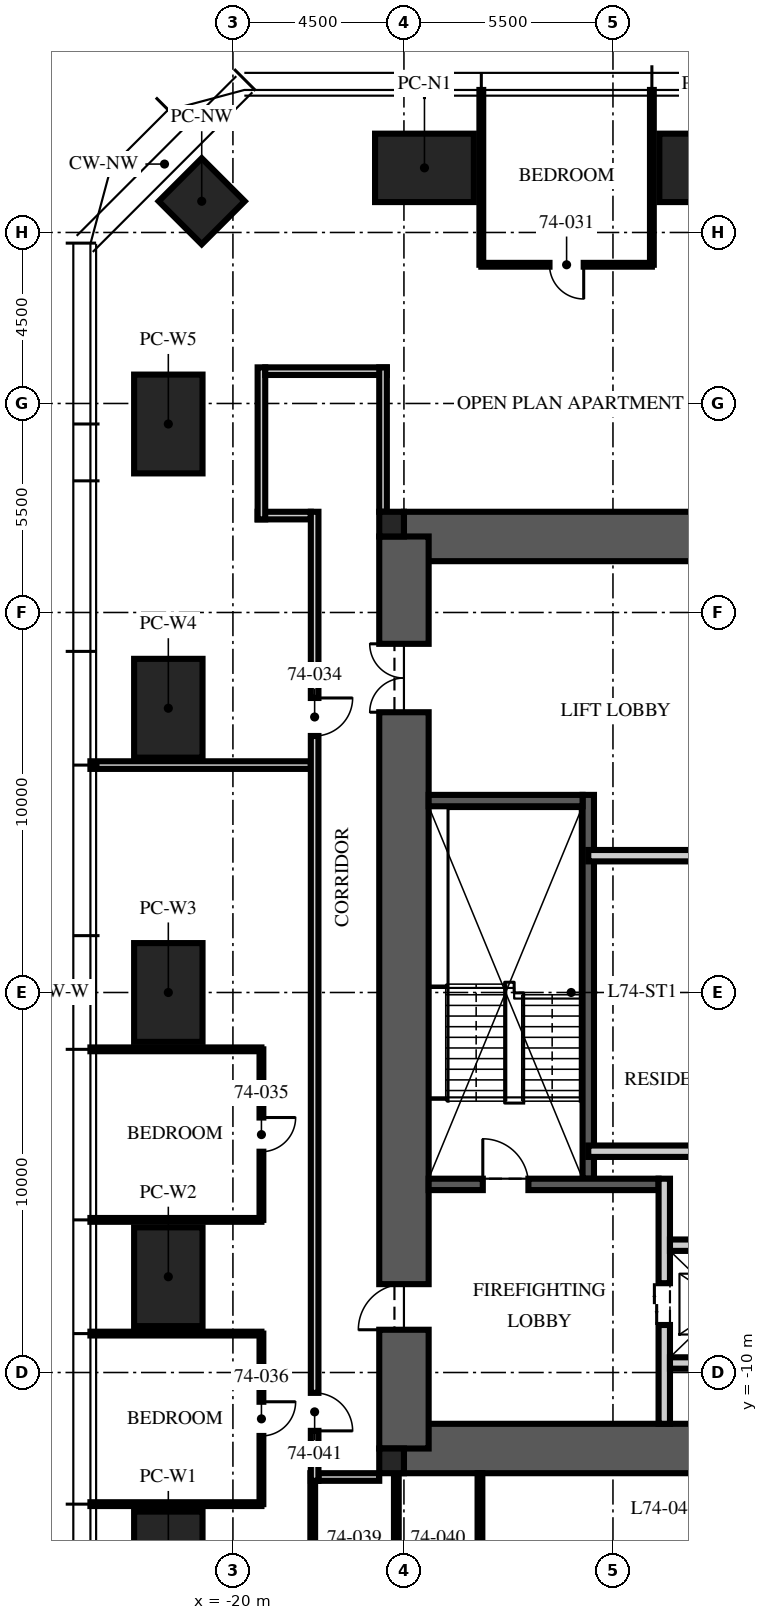
"""IFC4 building model, lengths in metres.
Left out: names, types, materials, properties, quantities, classifications, styles, units other than length and angle.
Written with IfcOpenShell. Run it as: python <this file> out.ifc"""

import sys

from ifc_helpers import new_model, si_unit, direction, frame, frame_2d, origin, origin_2d, place, context, subcontext, project, spatial, rectangle, extrude, element, fill, save


model = new_model("IFC4")
c1 = context("Model", 3, precision=1e-05, world=origin(), true_north=direction((0.0, 1.0)))
c2 = subcontext(c1, "Body", "Model", "MODEL_VIEW")
j1 = project(units=[si_unit("LENGTHUNIT", "METRE"), si_unit("PLANEANGLEUNIT", "RADIAN")], contexts=[c1])
p1 = place(None, origin())
s1 = spatial("IfcSite", under=j1, at=p1, CompositionType="ELEMENT")
p2 = place(p1, origin())
s2 = spatial("IfcBuilding", under=s1, at=p2, CompositionType="ELEMENT")
p3 = place(p2, frame((0.0, 0.0, 297.0)))
s3 = spatial("IfcBuildingStorey", under=s2, at=p3, CompositionType="ELEMENT", Elevation=297.0)
for number, where, z_axis, x_axis in (
    (1, (-15.5, 12.0, -0.25), (0.0, 0.0, 1.0), (1.0, 0.0, 0.0)),
    (2, (-15.5, -12.0, -0.25), (0.0, 0.0, 1.0), (1.0, 0.0, 0.0)),
):
    element("IfcWall", number, at=place(p3, frame(where, z_axis=z_axis, x_axis=x_axis)), inside=s3, PredefinedType="SHEAR", context=c2, shape_type="SweptSolid", body=[
        extrude(rectangle(XDim=31.0, YDim=1.3, at=frame_2d((15.5, 0.0))), origin(), (0.0, 0.0, 1.0), 3.75),
    ])
p4 = place(p3, frame((-15.5, -12.0, -0.25), z_axis=(0.0, 0.0, 1.0), x_axis=(0.0, 1.0, 0.0)))
e3 = element("IfcWall", 3, at=p4, inside=s3, PredefinedType="SHEAR", context=c2, shape_type="SweptSolid", body=[
    extrude(rectangle(XDim=24.0, YDim=1.3, at=frame_2d((12.0, 0.0))), origin(), (0.0, 0.0, 1.0), 3.75),
])
p5 = place(p4, frame((3.125, 0.0, 0.25)))
e4 = element("IfcOpeningElement", 4, at=p5, cuts=e3, PredefinedType="OPENING", context=c2, shape_type="SweptSolid", body=[
    extrude(rectangle(XDim=1.2, YDim=2.1, at=frame_2d((0.6, 1.05))), frame((0.0, 0.66, 0.0), z_axis=(0.0, -1.0, 0.0), x_axis=(1.0, 0.0, 0.0)), (0.0, 0.0, 1.0), 1.32),
])
p6 = place(p4, frame((19.375, 0.0, 0.25)))
e5 = element("IfcOpeningElement", 5, at=p6, cuts=e3, PredefinedType="OPENING", context=c2, shape_type="SweptSolid", body=[
    extrude(rectangle(XDim=1.8, YDim=2.1, at=frame_2d((0.9, 1.05))), frame((0.0, 0.66, 0.0), z_axis=(0.0, -1.0, 0.0), x_axis=(1.0, 0.0, 0.0)), (0.0, 0.0, 1.0), 1.32),
])
for number, where, z_axis, x_axis in (
    (6, (-15.825, 12.325, -0.25), (0.0, 0.0, 1.0), (1.0, 0.0, 0.0)),
    (7, (-15.825, -12.325, -0.25), (0.0, 0.0, 1.0), (1.0, 0.0, 0.0)),
):
    element("IfcColumn", number, at=place(p3, frame(where, z_axis=z_axis, x_axis=x_axis)), inside=s3, PredefinedType="COLUMN", context=c2, shape_type="SweptSolid", body=[
        extrude(rectangle(XDim=0.65, YDim=0.65, at=origin_2d()), origin(), (0.0, 0.0, 1.0), 3.75),
    ])
for number, where, z_axis, x_axis in (
    (8, (-14.96, 21.7, 0.0), (0.0, 0.0, 1.0), (1.0, 0.0, 0.0)),
    (9, (-7.48, 21.7, 0.0), (0.0, 0.0, 1.0), (1.0, 0.0, 0.0)),
    (10, (-21.7, -14.96, 0.0), (0.0, 0.0, 1.0), (0.0, 1.0, 0.0)),
    (11, (-21.7, -7.48, 0.0), (0.0, 0.0, 1.0), (0.0, 1.0, 0.0)),
    (12, (-21.7, 0.0, 0.0), (0.0, 0.0, 1.0), (0.0, 1.0, 0.0)),
    (13, (-21.7, 7.48, 0.0), (0.0, 0.0, 1.0), (0.0, 1.0, 0.0)),
    (14, (-21.7, 14.96, 0.0), (0.0, 0.0, 1.0), (0.0, 1.0, 0.0)),
):
    element("IfcColumn", number, at=place(p3, frame(where, z_axis=z_axis, x_axis=x_axis)), inside=s3, PredefinedType="COLUMN", context=c2, shape_type="SweptSolid", body=[
        extrude(rectangle(XDim=2.6, YDim=1.8, at=origin_2d()), origin(), (0.0, 0.0, 1.0), 3.75),
    ])
p7 = place(p3, frame((-20.821, 20.821, 0.0), z_axis=(0.0, 0.0, 1.0), x_axis=(0.707106781187, 0.707106781187, 0.0)))
e15 = element("IfcColumn", 15, at=p7, inside=s3, PredefinedType="COLUMN", context=c2, shape_type="SweptSolid", body=[
    extrude(rectangle(XDim=1.6, YDim=1.6, at=origin_2d()), origin(), (0.0, 0.0, 1.0), 3.75),
])
p8 = place(p3, frame((-10.65, -4.9, 0.0), z_axis=(0.0, 0.0, 1.0), x_axis=(0.0, 1.0, 0.0)))
e16 = element("IfcWall", 16, at=p8, inside=s3, PredefinedType="SOLIDWALL", context=c2, shape_type="SweptSolid", body=[
    extrude(rectangle(XDim=10.1, YDim=0.3, at=frame_2d((5.05, 0.0))), origin(), (0.0, 0.0, 1.0), 3.5),
])
p9 = place(p3, frame((-14.85, -5.05, 0.0), z_axis=(0.0, 0.0, 1.0), x_axis=(1.0, 0.0, 0.0)))
e17 = element("IfcWall", 17, at=p9, inside=s3, PredefinedType="SOLIDWALL", context=c2, shape_type="SweptSolid", body=[
    extrude(rectangle(XDim=6.05, YDim=0.3, at=frame_2d((3.025, 0.0))), origin(), (0.0, 0.0, 1.0), 3.5),
])
p10 = place(p9, frame((1.425, 0.0, 0.0)))
e18 = element("IfcOpeningElement", 18, at=p10, cuts=e17, PredefinedType="OPENING", context=c2, shape_type="SweptSolid", body=[
    extrude(rectangle(XDim=1.2, YDim=2.1, at=frame_2d((0.6, 1.05))), frame((0.0, 0.16, 0.0), z_axis=(0.0, -1.0, 0.0), x_axis=(1.0, 0.0, 0.0)), (0.0, 0.0, 1.0), 0.32),
])
p11 = place(p3, frame((-14.85, 5.05, 0.0), z_axis=(0.0, 0.0, 1.0), x_axis=(1.0, 0.0, 0.0)))
e19 = element("IfcWall", 19, at=p11, inside=s3, PredefinedType="SOLIDWALL", context=c2, shape_type="SweptSolid", body=[
    extrude(rectangle(XDim=4.05, YDim=0.3, at=frame_2d((2.025, 0.0))), origin(), (0.0, 0.0, 1.0), 3.5),
])
p12 = place(p3, frame((-8.65, -11.35, 0.0), z_axis=(0.0, 0.0, 1.0), x_axis=(0.0, 1.0, 0.0)))
e20 = element("IfcWall", 20, at=p12, inside=s3, PredefinedType="PARTITIONING", context=c2, shape_type="SweptSolid", body=[
    extrude(rectangle(XDim=6.45, YDim=0.3, at=frame_2d((3.225, 0.0))), origin(), (0.0, 0.0, 1.0), 3.5),
])
p13 = place(p12, frame((2.6, 0.0, 0.0)))
e21 = element("IfcOpeningElement", 21, at=p13, cuts=e20, PredefinedType="OPENING", context=c2, shape_type="SweptSolid", body=[
    extrude(rectangle(XDim=1.1, YDim=2.1, at=frame_2d((0.55, 1.05))), frame((0.0, 0.16, 0.0), z_axis=(0.0, -1.0, 0.0), x_axis=(1.0, 0.0, 0.0)), (0.0, 0.0, 1.0), 0.32),
])
p14 = place(p3, frame((-8.5, -6.65, 0.0), z_axis=(0.0, 0.0, 1.0), x_axis=(1.0, 0.0, 0.0)))
e22 = element("IfcWall", 22, at=p14, inside=s3, PredefinedType="PARTITIONING", context=c2, shape_type="SweptSolid", body=[
    extrude(rectangle(XDim=17.0, YDim=0.3, at=frame_2d((8.5, 0.0))), origin(), (0.0, 0.0, 1.0), 3.5),
])
p15 = place(p14, frame((7.8, 0.0, 0.0)))
e23 = element("IfcOpeningElement", 23, at=p15, cuts=e22, PredefinedType="OPENING", context=c2, shape_type="SweptSolid", body=[
    extrude(rectangle(XDim=1.3, YDim=2.4, at=frame_2d((0.65, 1.2))), frame((0.0, 0.16, 0.0), z_axis=(0.0, -1.0, 0.0), x_axis=(1.0, 0.0, 0.0)), (0.0, 0.0, 1.0), 0.32),
])
p16 = place(p14, frame((5.65, 0.0, 0.0)))
e24 = element("IfcOpeningElement", 24, at=p16, cuts=e22, PredefinedType="OPENING", context=c2, shape_type="SweptSolid", body=[
    extrude(rectangle(XDim=0.9, YDim=2.1, at=frame_2d((0.45, 1.05))), frame((0.0, 0.16, 0.0), z_axis=(0.0, -1.0, 0.0), x_axis=(1.0, 0.0, 0.0)), (0.0, 0.0, 1.0), 0.32),
])
p17 = place(p14, frame((10.4, 0.0, 0.0)))
e25 = element("IfcOpeningElement", 25, at=p17, cuts=e22, PredefinedType="OPENING", context=c2, shape_type="SweptSolid", body=[
    extrude(rectangle(XDim=0.9, YDim=2.1, at=frame_2d((0.45, 1.05))), frame((0.0, 0.16, 0.0), z_axis=(0.0, -1.0, 0.0), x_axis=(1.0, 0.0, 0.0)), (0.0, 0.0, 1.0), 0.32),
])
p18 = place(p3, frame((-8.5, -9.75, 0.0), z_axis=(0.0, 0.0, 1.0), x_axis=(1.0, 0.0, 0.0)))
e26 = element("IfcWall", 26, at=p18, inside=s3, PredefinedType="PARTITIONING", context=c2, shape_type="SweptSolid", body=[
    extrude(rectangle(XDim=2.9, YDim=0.3, at=frame_2d((1.45, 0.0))), origin(), (0.0, 0.0, 1.0), 3.5),
])
p19 = place(p3, frame((-10.65, 3.6, 0.0), z_axis=(0.0, 0.0, 1.0), x_axis=(1.0, 0.0, 0.0)))
e27 = element("IfcWall", 27, at=p19, inside=s3, PredefinedType="PARTITIONING", context=c2, shape_type="SweptSolid", body=[
    extrude(rectangle(XDim=21.3, YDim=0.3, at=frame_2d((10.65, 0.0))), origin(), (0.0, 0.0, 1.0), 3.5),
])
p20 = place(p19, frame((10.05, 0.0, 0.0)))
e28 = element("IfcOpeningElement", 28, at=p20, cuts=e27, PredefinedType="OPENING", context=c2, shape_type="SweptSolid", body=[
    extrude(rectangle(XDim=1.2, YDim=2.1, at=frame_2d((0.6, 1.05))), frame((0.0, 0.16, 0.0), z_axis=(0.0, -1.0, 0.0), x_axis=(1.0, 0.0, 0.0)), (0.0, 0.0, 1.0), 0.32),
])
p21 = place(p19, frame((19.238, 0.0, 0.0)))
e29 = element("IfcOpeningElement", 29, at=p21, cuts=e27, PredefinedType="OPENING", context=c2, shape_type="SweptSolid", body=[
    extrude(rectangle(XDim=0.9, YDim=2.1, at=frame_2d((0.45, 1.05))), frame((0.0, 0.16, 0.0), z_axis=(0.0, -1.0, 0.0), x_axis=(1.0, 0.0, 0.0)), (0.0, 0.0, 1.0), 0.32),
])
p22 = place(p3, frame((-10.65, -4.177, 0.0), z_axis=(0.0, 0.0, 1.0), x_axis=(1.0, 0.0, 0.0)))
e30 = element("IfcWall", 30, at=p22, inside=s3, PredefinedType="PARTITIONING", context=c2, shape_type="SweptSolid", body=[
    extrude(rectangle(XDim=6.45, YDim=0.3, at=frame_2d((3.225, 0.0))), origin(), (0.0, 0.0, 1.0), 3.5),
])
p23 = place(p3, frame((-17.95, 12.55, 0.0), z_axis=(0.0, 0.0, 1.0), x_axis=(-1.0, 0.0, 0.0)))
e31 = element("IfcWall", 31, at=p23, inside=s3, PredefinedType="PARTITIONING", context=c2, shape_type="SweptSolid", body=[
    extrude(rectangle(XDim=1.4, YDim=0.2, at=frame_2d((0.7, 0.0))), origin(), (0.0, 0.0, 1.0), 3.5),
])
p24 = place(p3, frame((-19.25, 12.45, 0.0), z_axis=(0.0, 0.0, 1.0), x_axis=(0.0, 1.0, 0.0)))
e32 = element("IfcWall", 32, at=p24, inside=s3, PredefinedType="PARTITIONING", context=c2, shape_type="SweptSolid", body=[
    extrude(rectangle(XDim=4.0, YDim=0.2, at=frame_2d((2.0, 0.0))), origin(), (0.0, 0.0, 1.0), 2.9),
])
p25 = place(p3, frame((-19.15, 16.35, 0.0), z_axis=(0.0, 0.0, 1.0), x_axis=(1.0, 0.0, 0.0)))
e33 = element("IfcWall", 33, at=p25, inside=s3, PredefinedType="PARTITIONING", context=c2, shape_type="SweptSolid", body=[
    extrude(rectangle(XDim=3.2, YDim=0.2, at=frame_2d((1.6, 0.0))), origin(), (0.0, 0.0, 1.0), 2.6),
])
p26 = place(p3, frame((-16.05, 16.45, 0.0), z_axis=(0.0, 0.0, 1.0), x_axis=(0.0, -1.0, 0.0)))
e34 = element("IfcWall", 34, at=p26, inside=s3, PredefinedType="PARTITIONING", context=c2, shape_type="SweptSolid", body=[
    extrude(rectangle(XDim=3.8, YDim=0.2, at=frame_2d((1.9, 0.0))), origin(), (0.0, 0.0, 1.0), 2.6),
])
p27 = place(p3, frame((-16.15, -12.75, 0.0), z_axis=(0.0, 0.0, 1.0), x_axis=(-1.0, 0.0, 0.0)))
e35 = element("IfcWall", 35, at=p27, inside=s3, PredefinedType="PARTITIONING", context=c2, shape_type="SweptSolid", body=[
    extrude(rectangle(XDim=1.6, YDim=0.2, at=frame_2d((0.8, 0.0))), origin(), (0.0, 0.0, 1.0), 2.6),
])
for number, where, z_axis, x_axis in (
    (36, (-8.976, 19.15, 0.0), (0.0, 0.0, 1.0), (0.0, 1.0, 0.0)),
    (37, (-13.464, 19.15, 0.0), (0.0, 0.0, 1.0), (0.0, 1.0, 0.0)),
):
    element("IfcWall", number, at=place(p3, frame(where, z_axis=z_axis, x_axis=x_axis)), inside=s3, PredefinedType="PARTITIONING", context=c2, shape_type="SweptSolid", body=[
        extrude(rectangle(XDim=4.6, YDim=0.1, at=frame_2d((2.3, 0.0))), origin(), (0.0, 0.0, 1.0), 3.01),
    ])
p28 = place(p3, frame((-17.95, 5.984, 0.0), z_axis=(0.0, 0.0, 1.0), x_axis=(-1.0, 0.0, 0.0)))
e38 = element("IfcWall", 38, at=p28, inside=s3, PredefinedType="PARTITIONING", context=c2, shape_type="SweptSolid", body=[
    extrude(rectangle(XDim=5.8, YDim=0.2, at=frame_2d((2.9, 0.0))), origin(), (0.0, 0.0, 1.0), 3.01),
])
for number, where, z_axis, x_axis in (
    (39, (-19.25, -1.496, 0.0), (0.0, 0.0, 1.0), (-1.0, 0.0, 0.0)),
    (40, (-19.25, -5.984, 0.0), (0.0, 0.0, 1.0), (-1.0, 0.0, 0.0)),
    (41, (-19.25, -8.976, 0.0), (0.0, 0.0, 1.0), (-1.0, 0.0, 0.0)),
    (42, (-19.25, -13.464, 0.0), (0.0, 0.0, 1.0), (-1.0, 0.0, 0.0)),
):
    element("IfcWall", number, at=place(p3, frame(where, z_axis=z_axis, x_axis=x_axis)), inside=s3, PredefinedType="PARTITIONING", context=c2, shape_type="SweptSolid", body=[
        extrude(rectangle(XDim=4.5, YDim=0.1, at=frame_2d((2.25, 0.0))), origin(), (0.0, 0.0, 1.0), 3.01),
    ])
p29 = place(p3, frame((-8.976, 19.15, 0.0), z_axis=(0.0, 0.0, 1.0), x_axis=(-1.0, 0.0, 0.0)))
e43 = element("IfcWall", 43, at=p29, inside=s3, PredefinedType="PARTITIONING", context=c2, shape_type="SweptSolid", body=[
    extrude(rectangle(XDim=4.488, YDim=0.1, at=frame_2d((2.244, 0.0))), origin(), (0.0, 0.0, 1.0), 2.91),
])
p30 = place(p29, frame((1.794, 0.0, 0.0)))
e44 = element("IfcOpeningElement", 44, at=p30, cuts=e43, PredefinedType="OPENING", context=c2, shape_type="SweptSolid", body=[
    extrude(rectangle(XDim=0.9, YDim=2.1, at=frame_2d((0.45, 1.05))), frame((0.0, 0.06, 0.0), z_axis=(0.0, -1.0, 0.0), x_axis=(1.0, 0.0, 0.0)), (0.0, 0.0, 1.0), 0.12),
])
p31 = place(p3, frame((-19.25, -1.496, 0.0), z_axis=(0.0, 0.0, 1.0), x_axis=(0.0, -1.0, 0.0)))
e45 = element("IfcWall", 45, at=p31, inside=s3, PredefinedType="PARTITIONING", context=c2, shape_type="SweptSolid", body=[
    extrude(rectangle(XDim=4.488, YDim=0.1, at=frame_2d((2.244, 0.0))), origin(), (0.0, 0.0, 1.0), 2.91),
])
p32 = place(p31, frame((1.794, 0.0, 0.0)))
e46 = element("IfcOpeningElement", 46, at=p32, cuts=e45, PredefinedType="OPENING", context=c2, shape_type="SweptSolid", body=[
    extrude(rectangle(XDim=0.9, YDim=2.1, at=frame_2d((0.45, 1.05))), frame((0.0, 0.06, 0.0), z_axis=(0.0, -1.0, 0.0), x_axis=(1.0, 0.0, 0.0)), (0.0, 0.0, 1.0), 0.12),
])
p33 = place(p3, frame((-19.25, -8.976, 0.0), z_axis=(0.0, 0.0, 1.0), x_axis=(0.0, -1.0, 0.0)))
e47 = element("IfcWall", 47, at=p33, inside=s3, PredefinedType="PARTITIONING", context=c2, shape_type="SweptSolid", body=[
    extrude(rectangle(XDim=4.488, YDim=0.1, at=frame_2d((2.244, 0.0))), origin(), (0.0, 0.0, 1.0), 2.91),
])
p34 = place(p33, frame((1.794, 0.0, 0.0)))
e48 = element("IfcOpeningElement", 48, at=p34, cuts=e47, PredefinedType="OPENING", context=c2, shape_type="SweptSolid", body=[
    extrude(rectangle(XDim=0.9, YDim=2.1, at=frame_2d((0.45, 1.05))), frame((0.0, 0.06, 0.0), z_axis=(0.0, -1.0, 0.0), x_axis=(1.0, 0.0, 0.0)), (0.0, 0.0, 1.0), 0.12),
])
p35 = place(p3, frame((-17.9, -12.65, 0.0), z_axis=(0.0, 0.0, 1.0), x_axis=(0.0, -1.0, 0.0)))
e49 = element("IfcWall", 49, at=p35, inside=s3, PredefinedType="PARTITIONING", context=c2, shape_type="SweptSolid", body=[
    extrude(rectangle(XDim=2.8, YDim=0.125, at=frame_2d((1.4, 0.0))), origin(), (0.0, 0.0, 1.0), 2.9),
])
p36 = place(p3, frame((-15.7, -12.65, 0.0), z_axis=(0.0, 0.0, 1.0), x_axis=(0.0, -1.0, 0.0)))
e50 = element("IfcWall", 50, at=p36, inside=s3, PredefinedType="PARTITIONING", context=c2, shape_type="SweptSolid", body=[
    extrude(rectangle(XDim=2.8, YDim=0.125, at=frame_2d((1.4, 0.0))), origin(), (0.0, 0.0, 1.0), 2.6),
])
p37 = place(p3, frame((-13.5, -12.65, 0.0), z_axis=(0.0, 0.0, 1.0), x_axis=(0.0, -1.0, 0.0)))
e51 = element("IfcWall", 51, at=p37, inside=s3, PredefinedType="PARTITIONING", context=c2, shape_type="SweptSolid", body=[
    extrude(rectangle(XDim=2.8, YDim=0.125, at=frame_2d((1.4, 0.0))), origin(), (0.0, 0.0, 1.0), 3.5),
])
p38 = place(p3, frame((-17.85, 12.65, 0.0), z_axis=(0.0, 0.0, 1.0), x_axis=(0.0, -1.0, 0.0)))
e52 = element("IfcWall", 52, at=p38, inside=s3, PredefinedType="PARTITIONING", context=c2, shape_type="SweptSolid", body=[
    extrude(rectangle(XDim=25.5, YDim=0.2, at=frame_2d((12.75, 0.0))), origin(), (0.0, 0.0, 1.0), 2.9),
])
p39 = place(p38, frame((4.9, 0.0, 0.0)))
e53 = element("IfcOpeningElement", 53, at=p39, cuts=e52, PredefinedType="OPENING", context=c2, shape_type="SweptSolid", body=[
    extrude(rectangle(XDim=1.0, YDim=2.2, at=frame_2d((0.5, 1.1))), frame((0.0, 0.11, 0.0), z_axis=(0.0, -1.0, 0.0), x_axis=(1.0, 0.0, 0.0)), (0.0, 0.0, 1.0), 0.22),
])
p40 = place(p38, frame((23.186, 0.0, 0.0)))
e54 = element("IfcOpeningElement", 54, at=p40, cuts=e52, PredefinedType="OPENING", context=c2, shape_type="SweptSolid", body=[
    extrude(rectangle(XDim=1.0, YDim=2.2, at=frame_2d((0.5, 1.1))), frame((0.0, 0.11, 0.0), z_axis=(0.0, -1.0, 0.0), x_axis=(1.0, 0.0, 0.0)), (0.0, 0.0, 1.0), 0.22),
])
p41 = place(p10, origin())
e55 = element("IfcDoor", 55, at=p41, inside=s3, OperationType="SINGLE_SWING_LEFT", PredefinedType="DOOR", context=c2, shape_type="SweptSolid", body=[
    extrude(rectangle(XDim=1.2, YDim=2.1, at=frame_2d((0.6, 1.05))), frame((0.0, 0.025, 0.0), z_axis=(0.0, -1.0, 0.0), x_axis=(1.0, 0.0, 0.0)), (0.0, 0.0, 1.0), 0.05),
])
fill(e18, e55)
p42 = place(p5, origin())
e56 = element("IfcDoor", 56, at=p42, inside=s3, OperationType="SINGLE_SWING_LEFT", PredefinedType="DOOR", context=c2, shape_type="SweptSolid", body=[
    extrude(rectangle(XDim=1.2, YDim=2.1, at=frame_2d((0.6, 1.05))), frame((0.0, 0.025, 0.0), z_axis=(0.0, -1.0, 0.0), x_axis=(1.0, 0.0, 0.0)), (0.0, 0.0, 1.0), 0.05),
])
fill(e4, e56)
p43 = place(p6, origin())
e57 = element("IfcDoor", 57, at=p43, inside=s3, OperationType="DOUBLE_DOOR_SINGLE_SWING", PredefinedType="DOOR", context=c2, shape_type="SweptSolid", body=[
    extrude(rectangle(XDim=1.8, YDim=2.1, at=frame_2d((0.9, 1.05))), frame((0.0, 0.025, 0.0), z_axis=(0.0, -1.0, 0.0), x_axis=(1.0, 0.0, 0.0)), (0.0, 0.0, 1.0), 0.05),
])
fill(e5, e57)
p44 = place(p13, origin())
e58 = element("IfcDoor", 58, at=p44, inside=s3, OperationType="DOUBLE_DOOR_SLIDING", PredefinedType="DOOR", context=c2, shape_type="SweptSolid", body=[
    extrude(rectangle(XDim=1.1, YDim=2.1, at=frame_2d((0.55, 1.05))), frame((0.0, 0.025, 0.0), z_axis=(0.0, -1.0, 0.0), x_axis=(1.0, 0.0, 0.0)), (0.0, 0.0, 1.0), 0.05),
])
fill(e21, e58)
p45 = place(p30, origin())
e59 = element("IfcDoor", 59, at=p45, inside=s3, OperationType="SINGLE_SWING_LEFT", PredefinedType="DOOR", context=c2, shape_type="SweptSolid", body=[
    extrude(rectangle(XDim=0.9, YDim=2.1, at=frame_2d((0.45, 1.05))), frame((0.0, 0.025, 0.0), z_axis=(0.0, -1.0, 0.0), x_axis=(1.0, 0.0, 0.0)), (0.0, 0.0, 1.0), 0.05),
])
fill(e44, e59)
p46 = place(p39, origin())
e60 = element("IfcDoor", 60, at=p46, inside=s3, OperationType="SINGLE_SWING_LEFT", PredefinedType="DOOR", context=c2, shape_type="SweptSolid", body=[
    extrude(rectangle(XDim=1.0, YDim=2.2, at=frame_2d((0.5, 1.1))), frame((0.0, 0.025, 0.0), z_axis=(0.0, -1.0, 0.0), x_axis=(1.0, 0.0, 0.0)), (0.0, 0.0, 1.0), 0.05),
])
fill(e53, e60)
p47 = place(p32, origin())
e61 = element("IfcDoor", 61, at=p47, inside=s3, OperationType="SINGLE_SWING_LEFT", PredefinedType="DOOR", context=c2, shape_type="SweptSolid", body=[
    extrude(rectangle(XDim=0.9, YDim=2.1, at=frame_2d((0.45, 1.05))), frame((0.0, 0.025, 0.0), z_axis=(0.0, -1.0, 0.0), x_axis=(1.0, 0.0, 0.0)), (0.0, 0.0, 1.0), 0.05),
])
fill(e46, e61)
p48 = place(p34, origin())
e62 = element("IfcDoor", 62, at=p48, inside=s3, OperationType="SINGLE_SWING_LEFT", PredefinedType="DOOR", context=c2, shape_type="SweptSolid", body=[
    extrude(rectangle(XDim=0.9, YDim=2.1, at=frame_2d((0.45, 1.05))), frame((0.0, 0.025, 0.0), z_axis=(0.0, -1.0, 0.0), x_axis=(1.0, 0.0, 0.0)), (0.0, 0.0, 1.0), 0.05),
])
fill(e48, e62)
p49 = place(p40, origin())
e63 = element("IfcDoor", 63, at=p49, inside=s3, OperationType="SINGLE_SWING_RIGHT", PredefinedType="DOOR", context=c2, shape_type="SweptSolid", body=[
    extrude(rectangle(XDim=1.0, YDim=2.2, at=frame_2d((0.5, 1.1))), frame((0.0, 0.025, 0.0), z_axis=(0.0, -1.0, 0.0), x_axis=(1.0, 0.0, 0.0)), (0.0, 0.0, 1.0), 0.05),
])
fill(e54, e63)
save(model, sys.argv[1])
